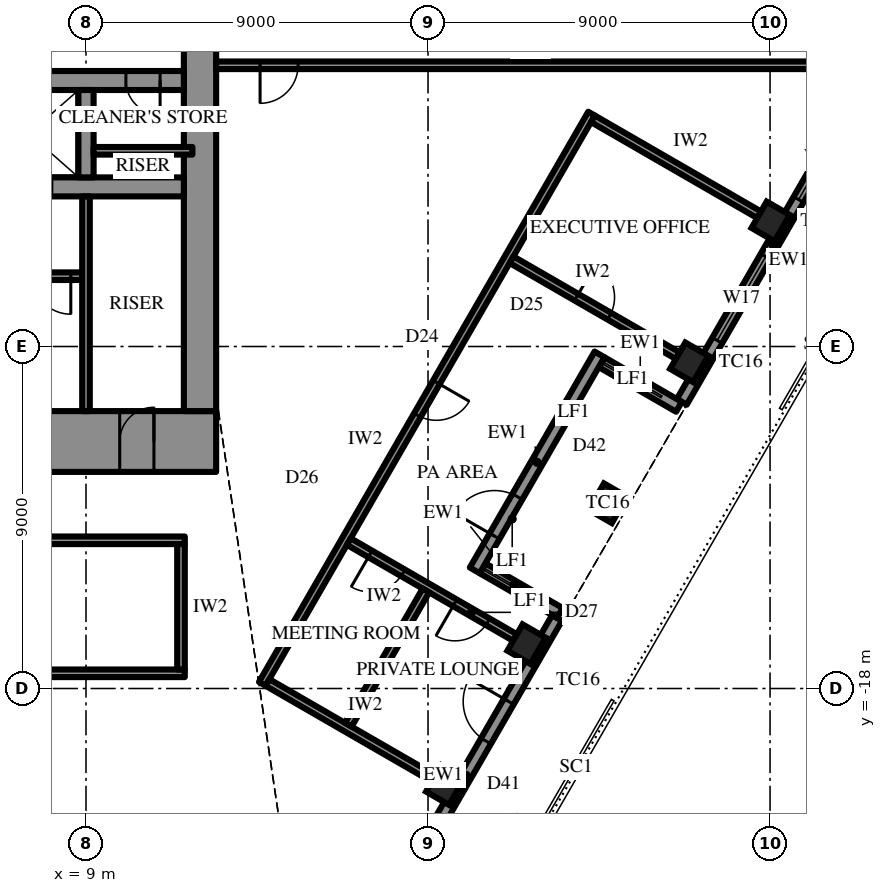
"""IFC4 building model, lengths in metres.
Left out: names, types, materials, properties, quantities, classifications, styles, units other than length and angle.
Written with IfcOpenShell. Run it as: python <this file> out.ifc"""

import sys

from ifc_helpers import new_model, si_unit, direction, frame, frame_2d, origin, origin_2d, place, context, subcontext, project, spatial, rectangle, extrude, element, fill, save


model = new_model("IFC4")
c1 = context("Model", 3, precision=1e-05, world=origin(), true_north=direction((0.0, 1.0)))
c2 = subcontext(c1, "Body", "Model", "MODEL_VIEW")
j1 = project(units=[si_unit("LENGTHUNIT", "METRE"), si_unit("PLANEANGLEUNIT", "RADIAN")], contexts=[c1])
p1 = place(None, origin())
s1 = spatial("IfcSite", under=j1, at=p1, CompositionType="ELEMENT")
p2 = place(p1, origin())
s2 = spatial("IfcBuilding", under=s1, at=p2, CompositionType="ELEMENT")
p3 = place(p2, frame((0.0, 0.0, 378.7)))
s3 = spatial("IfcBuildingStorey", under=s2, at=p3, CompositionType="ELEMENT", Elevation=378.7)
for number, where, z_axis, x_axis in (
    (1, (18.451, -20.542, 0.0), (0.0, 0.0, 1.0), (0.5, 0.866, 0.0)),
    (2, (20.592, -16.833, 0.0), (0.0, 0.0, 1.0), (0.5, 0.866, 0.0)),
    (3, (22.733, -13.125, 0.0), (0.0, 0.0, 1.0), (0.5, 0.866, 0.0)),
    (4, (24.874, -9.417, 0.0), (0.0, 0.0, 1.0), (0.5, 0.866, 0.0)),
    (5, (27.015, -5.708, 0.0), (0.0, 0.0, 1.0), (0.5, 0.866, 0.0)),
):
    element("IfcColumn", number, at=place(p3, frame(where, z_axis=z_axis, x_axis=x_axis)), inside=s3, PredefinedType="COLUMN", context=c2, shape_type="SweptSolid", body=[
        extrude(rectangle(XDim=0.8, YDim=0.7, at=origin_2d()), origin(), (0.0, 0.0, 1.0), 4.2),
    ])
p4 = place(p3, frame((12.425, -11.5, 0.0), z_axis=(0.0, 0.0, 1.0), x_axis=(-1.0, 0.0, 0.0)))
e6 = element("IfcWall", 6, at=p4, inside=s3, PredefinedType="SHEAR", context=c2, shape_type="SweptSolid", body=[
    extrude(rectangle(XDim=24.85, YDim=1.6, at=frame_2d((12.425, 0.0))), origin(), (0.0, 0.0, 1.0), 4.2),
])
p5 = place(p4, frame((13.275, 0.0, 0.0)))
e7 = element("IfcOpeningElement", 7, at=p5, cuts=e6, PredefinedType="OPENING", context=c2, shape_type="SweptSolid", body=[
    extrude(rectangle(XDim=0.9, YDim=2.2, at=frame_2d((0.45, 1.1))), frame((0.0, 0.81, 0.0), z_axis=(0.0, -1.0, 0.0), x_axis=(1.0, 0.0, 0.0)), (0.0, 0.0, 1.0), 1.62),
])
p6 = place(p4, frame((16.275, 0.0, 0.0)))
e8 = element("IfcOpeningElement", 8, at=p6, cuts=e6, PredefinedType="OPENING", context=c2, shape_type="SweptSolid", body=[
    extrude(rectangle(XDim=0.9, YDim=2.2, at=frame_2d((0.45, 1.1))), frame((0.0, 0.81, 0.0), z_axis=(0.0, -1.0, 0.0), x_axis=(1.0, 0.0, 0.0)), (0.0, 0.0, 1.0), 1.62),
])
p7 = place(p4, frame((19.325, 0.0, 0.0)))
e9 = element("IfcOpeningElement", 9, at=p7, cuts=e6, PredefinedType="OPENING", context=c2, shape_type="SweptSolid", body=[
    extrude(rectangle(XDim=1.0, YDim=2.2, at=frame_2d((0.5, 1.1))), frame((0.0, 0.81, 0.0), z_axis=(0.0, -1.0, 0.0), x_axis=(1.0, 0.0, 0.0)), (0.0, 0.0, 1.0), 1.62),
])
p8 = place(p4, frame((1.637, 0.0, 0.0)))
e10 = element("IfcOpeningElement", 10, at=p8, cuts=e6, PredefinedType="OPENING", context=c2, shape_type="SweptSolid", body=[
    extrude(rectangle(XDim=0.9, YDim=2.2, at=frame_2d((0.45, 1.1))), frame((0.0, 0.81, 0.0), z_axis=(0.0, -1.0, 0.0), x_axis=(1.0, 0.0, 0.0)), (0.0, 0.0, 1.0), 1.62),
])
p9 = place(p4, frame((22.312, 0.0, 0.0)))
e11 = element("IfcOpeningElement", 11, at=p9, cuts=e6, PredefinedType="OPENING", context=c2, shape_type="SweptSolid", body=[
    extrude(rectangle(XDim=0.9, YDim=2.2, at=frame_2d((0.45, 1.1))), frame((0.0, 0.81, 0.0), z_axis=(0.0, -1.0, 0.0), x_axis=(1.0, 0.0, 0.0)), (0.0, 0.0, 1.0), 1.62),
])
p10 = place(p3, frame((12.0, -10.7, 0.0), z_axis=(0.0, 0.0, 1.0), x_axis=(0.0, 1.0, 0.0)))
e12 = element("IfcWall", 12, at=p10, inside=s3, PredefinedType="SHEAR", context=c2, shape_type="SweptSolid", body=[
    extrude(rectangle(XDim=21.4, YDim=0.85, at=frame_2d((10.7, 0.0))), origin(), (0.0, 0.0, 1.0), 4.2),
])
p11 = place(p10, frame((9.8, 0.0, 0.0)))
e13 = element("IfcOpeningElement", 13, at=p11, cuts=e12, PredefinedType="OPENING", context=c2, shape_type="SweptSolid", body=[
    extrude(rectangle(XDim=1.8, YDim=2.4, at=frame_2d((0.9, 1.2))), frame((0.0, 0.435, 0.0), z_axis=(0.0, -1.0, 0.0), x_axis=(1.0, 0.0, 0.0)), (0.0, 0.0, 1.0), 0.87),
])
p12 = place(p3, frame((11.575, -2.0, 0.0), z_axis=(0.0, 0.0, 1.0), x_axis=(-1.0, 0.0, 0.0)))
e14 = element("IfcWall", 14, at=p12, inside=s3, PredefinedType="SHEAR", context=c2, shape_type="SweptSolid", body=[
    extrude(rectangle(XDim=5.775, YDim=0.5, at=frame_2d((2.887, 0.0))), origin(), (0.0, 0.0, 1.0), 4.2),
])
p13 = place(p12, frame((0.625, 0.0, 0.0)))
e15 = element("IfcOpeningElement", 15, at=p13, cuts=e14, PredefinedType="OPENING", context=c2, shape_type="SweptSolid", body=[
    extrude(rectangle(XDim=0.9, YDim=2.2, at=frame_2d((0.45, 1.1))), frame((0.0, 0.26, 0.0), z_axis=(0.0, -1.0, 0.0), x_axis=(1.0, 0.0, 0.0)), (0.0, 0.0, 1.0), 0.52),
])
p14 = place(p3, frame((11.575, -4.8, 0.0), z_axis=(0.0, 0.0, 1.0), x_axis=(-1.0, 0.0, 0.0)))
e16 = element("IfcWall", 16, at=p14, inside=s3, PredefinedType="SHEAR", context=c2, shape_type="SweptSolid", body=[
    extrude(rectangle(XDim=23.15, YDim=0.5, at=frame_2d((11.575, 0.0))), origin(), (0.0, 0.0, 1.0), 4.2),
])
p15 = place(p14, frame((6.475, 0.0, 0.0)))
e17 = element("IfcOpeningElement", 17, at=p15, cuts=e16, PredefinedType="OPENING", context=c2, shape_type="SweptSolid", body=[
    extrude(rectangle(XDim=1.2, YDim=2.2, at=frame_2d((0.6, 1.1))), frame((0.0, 0.26, 0.0), z_axis=(0.0, -1.0, 0.0), x_axis=(1.0, 0.0, 0.0)), (0.0, 0.0, 1.0), 0.52),
])
p16 = place(p14, frame((3.475, 0.0, 0.0)))
e18 = element("IfcOpeningElement", 18, at=p16, cuts=e16, PredefinedType="OPENING", context=c2, shape_type="SweptSolid", body=[
    extrude(rectangle(XDim=1.2, YDim=2.2, at=frame_2d((0.6, 1.1))), frame((0.0, 0.26, 0.0), z_axis=(0.0, -1.0, 0.0), x_axis=(1.0, 0.0, 0.0)), (0.0, 0.0, 1.0), 0.52),
])
p17 = place(p3, frame((9.0, -2.25, 0.0), z_axis=(0.0, 0.0, 1.0), x_axis=(0.0, -1.0, 0.0)))
e19 = element("IfcWall", 19, at=p17, inside=s3, PredefinedType="SHEAR", context=c2, shape_type="SweptSolid", body=[
    extrude(rectangle(XDim=2.3, YDim=0.4, at=frame_2d((1.15, 0.0))), origin(), (0.0, 0.0, 1.0), 4.2),
])
p18 = place(p3, frame((8.9, -7.15, 0.0), z_axis=(0.0, 0.0, 1.0), x_axis=(-1.0, 0.0, 0.0)))
e20 = element("IfcWall", 20, at=p18, inside=s3, PredefinedType="SHEAR", context=c2, shape_type="SweptSolid", body=[
    extrude(rectangle(XDim=8.6, YDim=0.2, at=frame_2d((4.3, 0.0))), origin(), (0.0, 0.0, 1.0), 4.2),
])
p19 = place(p18, frame((0.3, 0.0, 0.0)))
e21 = element("IfcOpeningElement", 21, at=p19, cuts=e20, PredefinedType="OPENING", context=c2, shape_type="SweptSolid", body=[
    extrude(rectangle(XDim=1.0, YDim=2.2, at=frame_2d((0.5, 1.1))), frame((0.0, 0.11, 0.0), z_axis=(0.0, -1.0, 0.0), x_axis=(1.0, 0.0, 0.0)), (0.0, 0.0, 1.0), 0.22),
])
p20 = place(p3, frame((16.613, -24.425, 0.0), z_axis=(0.0, 0.0, 1.0), x_axis=(0.499996453679, 0.866027451244, 0.0)))
e22 = element("IfcWall", 22, at=p20, inside=s3, PredefinedType="SOLIDWALL", context=c2, shape_type="SweptSolid", body=[
    extrude(rectangle(XDim=9.564, YDim=0.3, at=frame_2d((4.782, 0.0))), origin(), (0.0, 0.0, 1.0), 2.9),
])
p21 = place(p20, frame((0.866, 0.0, 0.6)))
e23 = element("IfcOpeningElement", 23, at=p21, cuts=e22, PredefinedType="OPENING", context=c2, shape_type="SweptSolid", body=[
    extrude(rectangle(XDim=2.55, YDim=2.05, at=frame_2d((1.275, 1.025))), frame((0.0, 0.16, 0.0), z_axis=(0.0, -1.0, 0.0), x_axis=(1.0, 0.0, 0.0)), (0.0, 0.0, 1.0), 0.32),
])
p22 = place(p20, frame((5.823, 0.0, 0.0)))
e24 = element("IfcOpeningElement", 24, at=p22, cuts=e22, PredefinedType="OPENING", context=c2, shape_type="SweptSolid", body=[
    extrude(rectangle(XDim=1.2, YDim=2.4, at=frame_2d((0.6, 1.2))), frame((0.0, 0.16, 0.0), z_axis=(0.0, -1.0, 0.0), x_axis=(1.0, 0.0, 0.0)), (0.0, 0.0, 1.0), 0.32),
])
p23 = place(p3, frame((24.677, -10.458, 0.0), z_axis=(0.0, 0.0, 1.0), x_axis=(0.499996453679, 0.866027451244, 0.0)))
e25 = element("IfcWall", 25, at=p23, inside=s3, PredefinedType="SOLIDWALL", context=c2, shape_type="SweptSolid", body=[
    extrude(rectangle(XDim=9.564, YDim=0.3, at=frame_2d((4.782, 0.0))), origin(), (0.0, 0.0, 1.0), 2.9),
])
p24 = place(p23, frame((1.866, 0.0, 0.6)))
e26 = element("IfcOpeningElement", 26, at=p24, cuts=e25, PredefinedType="OPENING", context=c2, shape_type="SweptSolid", body=[
    extrude(rectangle(XDim=2.55, YDim=2.05, at=frame_2d((1.275, 1.025))), frame((0.0, 0.16, 0.0), z_axis=(0.0, -1.0, 0.0), x_axis=(1.0, 0.0, 0.0)), (0.0, 0.0, 1.0), 0.32),
])
p25 = place(p23, frame((6.148, 0.0, 0.6)))
e27 = element("IfcOpeningElement", 27, at=p25, cuts=e25, PredefinedType="OPENING", context=c2, shape_type="SweptSolid", body=[
    extrude(rectangle(XDim=2.55, YDim=2.05, at=frame_2d((1.275, 1.025))), frame((0.0, 0.16, 0.0), z_axis=(0.0, -1.0, 0.0), x_axis=(1.0, 0.0, 0.0)), (0.0, 0.0, 1.0), 0.32),
])
for number, where, z_axis, x_axis in (
    (28, (21.47, -16.012, 0.0), (0.0, 0.0, 1.0), (-0.866, 0.5, 0.0)),
    (29, (24.602, -10.588, 0.0), (0.0, 0.0, 1.0), (-0.866, 0.5, 0.0)),
):
    element("IfcWall", number, at=place(p3, frame(where, z_axis=z_axis, x_axis=x_axis)), inside=s3, PredefinedType="SOLIDWALL", context=c2, shape_type="SweptSolid", body=[
        extrude(rectangle(XDim=2.35, YDim=0.3, at=frame_2d((1.175, 0.0))), origin(), (0.0, 0.0, 1.0), 2.9),
    ])
p26 = place(p3, frame((19.23, -14.892, 0.0), z_axis=(0.0, 0.0, 1.0), x_axis=(0.499999339774, 0.866025784966, 0.0)))
e30 = element("IfcWall", 30, at=p26, inside=s3, PredefinedType="SOLIDWALL", context=c2, shape_type="SweptSolid", body=[
    extrude(rectangle(XDim=6.564, YDim=0.3, at=frame_2d((3.282, 0.0))), origin(), (0.0, 0.0, 1.0), 2.9),
])
p27 = place(p26, frame((1.041, 0.0, 0.0)))
e31 = element("IfcOpeningElement", 31, at=p27, cuts=e30, PredefinedType="OPENING", context=c2, shape_type="SweptSolid", body=[
    extrude(rectangle(XDim=1.2, YDim=2.4, at=frame_2d((0.6, 1.2))), frame((0.0, 0.16, 0.0), z_axis=(0.0, -1.0, 0.0), x_axis=(1.0, 0.0, 0.0)), (0.0, 0.0, 1.0), 0.32),
])
p28 = place(p3, frame((9.0, -5.05, 0.0), z_axis=(0.0, 0.0, 1.0), x_axis=(0.0, -1.0, 0.0)))
e32 = element("IfcWall", 32, at=p28, inside=s3, PredefinedType="PARTITIONING", context=c2, shape_type="SweptSolid", body=[
    extrude(rectangle(XDim=5.65, YDim=0.2, at=frame_2d((2.825, 0.0))), origin(), (0.0, 0.0, 1.0), 4.0),
])
p29 = place(p3, frame((11.8, -3.85, 0.0), z_axis=(0.0, 0.0, 1.0), x_axis=(-1.0, 0.0, 0.0)))
e33 = element("IfcWall", 33, at=p29, inside=s3, PredefinedType="PARTITIONING", context=c2, shape_type="SweptSolid", body=[
    extrude(rectangle(XDim=2.6, YDim=0.2, at=frame_2d((1.3, 0.0))), origin(), (0.0, 0.0, 1.0), 4.0),
])
p30 = place(p3, frame((11.6, -14.1, 0.0), z_axis=(0.0, 0.0, 1.0), x_axis=(-1.0, 0.0, 0.0)))
e34 = element("IfcWall", 34, at=p30, inside=s3, PredefinedType="PARTITIONING", context=c2, shape_type="SweptSolid", body=[
    extrude(rectangle(XDim=23.2, YDim=0.2, at=frame_2d((11.6, 0.0))), origin(), (0.0, 0.0, 1.0), 4.0),
])
p31 = place(p3, frame((11.6, -17.6, 0.0), z_axis=(0.0, 0.0, 1.0), x_axis=(-1.0, 0.0, 0.0)))
e35 = element("IfcWall", 35, at=p31, inside=s3, PredefinedType="PARTITIONING", context=c2, shape_type="SweptSolid", body=[
    extrude(rectangle(XDim=23.2, YDim=0.2, at=frame_2d((11.6, 0.0))), origin(), (0.0, 0.0, 1.0), 4.0),
])
p32 = place(p31, frame((4.2, 0.0, 0.0)))
e36 = element("IfcOpeningElement", 36, at=p32, cuts=e35, PredefinedType="OPENING", context=c2, shape_type="SweptSolid", body=[
    extrude(rectangle(XDim=1.0, YDim=2.2, at=frame_2d((0.5, 1.1))), frame((0.0, 0.11, 0.0), z_axis=(0.0, -1.0, 0.0), x_axis=(1.0, 0.0, 0.0)), (0.0, 0.0, 1.0), 0.22),
])
p33 = place(p31, frame((12.25, 0.0, 0.0)))
e37 = element("IfcOpeningElement", 37, at=p33, cuts=e35, PredefinedType="OPENING", context=c2, shape_type="SweptSolid", body=[
    extrude(rectangle(XDim=1.0, YDim=2.2, at=frame_2d((0.5, 1.1))), frame((0.0, 0.11, 0.0), z_axis=(0.0, -1.0, 0.0), x_axis=(1.0, 0.0, 0.0)), (0.0, 0.0, 1.0), 0.22),
])
p34 = place(p31, frame((19.15, 0.0, 0.0)))
e38 = element("IfcOpeningElement", 38, at=p34, cuts=e35, PredefinedType="OPENING", context=c2, shape_type="SweptSolid", body=[
    extrude(rectangle(XDim=1.0, YDim=2.2, at=frame_2d((0.5, 1.1))), frame((0.0, 0.11, 0.0), z_axis=(0.0, -1.0, 0.0), x_axis=(1.0, 0.0, 0.0)), (0.0, 0.0, 1.0), 0.22),
])
p35 = place(p3, frame((11.5, -14.2, 0.0), z_axis=(0.0, 0.0, 1.0), x_axis=(0.0, -1.0, 0.0)))
e39 = element("IfcWall", 39, at=p35, inside=s3, PredefinedType="PARTITIONING", context=c2, shape_type="SweptSolid", body=[
    extrude(rectangle(XDim=3.3, YDim=0.2, at=frame_2d((1.65, 0.0))), origin(), (0.0, 0.0, 1.0), 4.0),
])
p36 = place(p3, frame((13.638, -17.878, 0.0), z_axis=(0.0, 0.0, 1.0), x_axis=(0.500006217173, 0.866021814268, 0.0)))
e40 = element("IfcWall", 40, at=p36, inside=s3, PredefinedType="PARTITIONING", context=c2, shape_type="SweptSolid", body=[
    extrude(rectangle(XDim=17.328, YDim=0.2, at=frame_2d((8.664, 0.0))), origin(), (0.0, 0.0, 1.0), 4.0),
])
p37 = place(p36, frame((8.164, 0.0, 0.0)))
e41 = element("IfcOpeningElement", 41, at=p37, cuts=e40, PredefinedType="OPENING", context=c2, shape_type="SweptSolid", body=[
    extrude(rectangle(XDim=1.0, YDim=2.2, at=frame_2d((0.5, 1.1))), frame((0.0, 0.11, 0.0), z_axis=(0.0, -1.0, 0.0), x_axis=(1.0, 0.0, 0.0)), (0.0, 0.0, 1.0), 0.22),
])
p38 = place(p3, frame((13.775, -17.842, 0.0), z_axis=(0.0, 0.0, 1.0), x_axis=(0.866006046928, -0.500033525561, 0.0)))
e42 = element("IfcWall", 42, at=p38, inside=s3, PredefinedType="PARTITIONING", context=c2, shape_type="SweptSolid", body=[
    extrude(rectangle(XDim=5.05, YDim=0.2, at=frame_2d((2.525, 0.0))), origin(), (0.0, 0.0, 1.0), 3.082),
])
p39 = place(p3, frame((15.916, -14.133, 0.0), z_axis=(0.0, 0.0, 1.0), x_axis=(0.866018134068, -0.500012591307, 0.0)))
e43 = element("IfcWall", 43, at=p39, inside=s3, PredefinedType="PARTITIONING", context=c2, shape_type="SweptSolid", body=[
    extrude(rectangle(XDim=5.05, YDim=0.2, at=frame_2d((2.525, 0.0))), origin(), (0.0, 0.0, 1.0), 3.082),
])
p40 = place(p39, frame((0.65, 0.0, 0.0)))
e44 = element("IfcOpeningElement", 44, at=p40, cuts=e43, PredefinedType="OPENING", context=c2, shape_type="SweptSolid", body=[
    extrude(rectangle(XDim=1.0, YDim=2.2, at=frame_2d((0.5, 1.1))), frame((0.0, 0.11, 0.0), z_axis=(0.0, -1.0, 0.0), x_axis=(1.0, 0.0, 0.0)), (0.0, 0.0, 1.0), 0.22),
])
p41 = place(p39, frame((3.225, 0.0, 0.0)))
e45 = element("IfcOpeningElement", 45, at=p41, cuts=e43, PredefinedType="OPENING", context=c2, shape_type="SweptSolid", body=[
    extrude(rectangle(XDim=1.0, YDim=2.2, at=frame_2d((0.5, 1.1))), frame((0.0, 0.11, 0.0), z_axis=(0.0, -1.0, 0.0), x_axis=(1.0, 0.0, 0.0)), (0.0, 0.0, 1.0), 0.22),
])
p42 = place(p3, frame((20.198, -6.717, 0.0), z_axis=(0.0, 0.0, 1.0), x_axis=(0.866006046928, -0.500033525561, 0.0)))
e46 = element("IfcWall", 46, at=p42, inside=s3, PredefinedType="PARTITIONING", context=c2, shape_type="SweptSolid", body=[
    extrude(rectangle(XDim=5.05, YDim=0.2, at=frame_2d((2.525, 0.0))), origin(), (0.0, 0.0, 1.0), 2.992),
])
p43 = place(p42, frame((1.975, 0.0, 0.0)))
e47 = element("IfcOpeningElement", 47, at=p43, cuts=e46, PredefinedType="OPENING", context=c2, shape_type="SweptSolid", body=[
    extrude(rectangle(XDim=1.0, YDim=2.2, at=frame_2d((0.5, 1.1))), frame((0.0, 0.11, 0.0), z_axis=(0.0, -1.0, 0.0), x_axis=(1.0, 0.0, 0.0)), (0.0, 0.0, 1.0), 0.22),
])
p44 = place(p3, frame((22.339, -3.008, 0.0), z_axis=(0.0, 0.0, 1.0), x_axis=(0.866018134068, -0.500012591307, 0.0)))
e48 = element("IfcWall", 48, at=p44, inside=s3, PredefinedType="PARTITIONING", context=c2, shape_type="SweptSolid", body=[
    extrude(rectangle(XDim=5.05, YDim=0.2, at=frame_2d((2.525, 0.0))), origin(), (0.0, 0.0, 1.0), 3.082),
])
p45 = place(p3, frame((15.903, -18.955, 0.0), z_axis=(0.0, 0.0, 1.0), x_axis=(0.499998569178, 0.866026229868, 0.0)))
e49 = element("IfcWall", 49, at=p45, inside=s3, PredefinedType="PARTITIONING", context=c2, shape_type="SweptSolid", body=[
    extrude(rectangle(XDim=4.082, YDim=0.2, at=frame_2d((2.041, 0.0))), origin(), (0.0, 0.0, 1.0), 4.0),
])
p46 = place(p3, frame((12.425, -1.6, 0.0), z_axis=(0.0, 0.0, 1.0), x_axis=(1.0, 0.0, 0.0)))
e50 = element("IfcWall", 50, at=p46, inside=s3, PredefinedType="PARTITIONING", context=c2, shape_type="SweptSolid", body=[
    extrude(rectangle(XDim=16.558, YDim=0.2, at=frame_2d((8.279, 0.0))), origin(), (0.0, 0.0, 1.0), 4.0),
])
p47 = place(p46, frame((1.156, 0.0, 0.0)))
e51 = element("IfcOpeningElement", 51, at=p47, cuts=e50, PredefinedType="OPENING", context=c2, shape_type="SweptSolid", body=[
    extrude(rectangle(XDim=1.0, YDim=2.2, at=frame_2d((0.5, 1.1))), frame((0.0, 0.11, 0.0), z_axis=(0.0, -1.0, 0.0), x_axis=(1.0, 0.0, 0.0)), (0.0, 0.0, 1.0), 0.22),
])
p48 = place(p22, origin())
e52 = element("IfcDoor", 52, at=p48, inside=s3, OperationType="SINGLE_SWING_LEFT", PredefinedType="DOOR", context=c2, shape_type="SweptSolid", body=[
    extrude(rectangle(XDim=1.2, YDim=2.4, at=frame_2d((0.6, 1.2))), frame((0.0, 0.025, 0.0), z_axis=(0.0, -1.0, 0.0), x_axis=(1.0, 0.0, 0.0)), (0.0, 0.0, 1.0), 0.05),
])
fill(e24, e52)
p49 = place(p24, origin())
e53 = element("IfcWindow", 53, at=p49, inside=s3, PartitioningType="SINGLE_PANEL", PredefinedType="WINDOW", context=c2, shape_type="SweptSolid", body=[
    extrude(rectangle(XDim=2.55, YDim=2.05, at=frame_2d((1.275, 1.025))), frame((0.0, 0.03, 0.0), z_axis=(0.0, -1.0, 0.0), x_axis=(1.0, 0.0, 0.0)), (0.0, 0.0, 1.0), 0.06),
])
fill(e26, e53)
p50 = place(p25, origin())
e54 = element("IfcWindow", 54, at=p50, inside=s3, PartitioningType="SINGLE_PANEL", PredefinedType="WINDOW", context=c2, shape_type="SweptSolid", body=[
    extrude(rectangle(XDim=2.55, YDim=2.05, at=frame_2d((1.275, 1.025))), frame((0.0, 0.03, 0.0), z_axis=(0.0, -1.0, 0.0), x_axis=(1.0, 0.0, 0.0)), (0.0, 0.0, 1.0), 0.06),
])
fill(e27, e54)
p51 = place(p27, origin())
e55 = element("IfcDoor", 55, at=p51, inside=s3, OperationType="SINGLE_SWING_RIGHT", PredefinedType="DOOR", context=c2, shape_type="SweptSolid", body=[
    extrude(rectangle(XDim=1.2, YDim=2.4, at=frame_2d((0.6, 1.2))), frame((0.0, 0.025, 0.0), z_axis=(0.0, -1.0, 0.0), x_axis=(1.0, 0.0, 0.0)), (0.0, 0.0, 1.0), 0.05),
])
fill(e31, e55)
p52 = place(p19, origin())
e56 = element("IfcDoor", 56, at=p52, inside=s3, OperationType="SINGLE_SWING_RIGHT", PredefinedType="DOOR", context=c2, shape_type="SweptSolid", body=[
    extrude(rectangle(XDim=1.0, YDim=2.2, at=frame_2d((0.5, 1.1))), frame((0.0, 0.025, 0.0), z_axis=(0.0, -1.0, 0.0), x_axis=(1.0, 0.0, 0.0)), (0.0, 0.0, 1.0), 0.05),
])
fill(e21, e56)
p53 = place(p8, frame((0.9, 0.0, 0.0), z_axis=(0.0, 0.0, 1.0), x_axis=(-1.0, 0.0, 0.0)))
e57 = element("IfcDoor", 57, at=p53, inside=s3, OperationType="SINGLE_SWING_LEFT", PredefinedType="DOOR", context=c2, shape_type="SweptSolid", body=[
    extrude(rectangle(XDim=0.9, YDim=2.2, at=frame_2d((0.45, 1.1))), frame((0.0, 0.025, 0.0), z_axis=(0.0, -1.0, 0.0), x_axis=(1.0, 0.0, 0.0)), (0.0, 0.0, 1.0), 0.05),
])
fill(e10, e57)
p54 = place(p13, origin())
e58 = element("IfcDoor", 58, at=p54, inside=s3, OperationType="SINGLE_SWING_RIGHT", PredefinedType="DOOR", context=c2, shape_type="SweptSolid", body=[
    extrude(rectangle(XDim=0.9, YDim=2.2, at=frame_2d((0.45, 1.1))), frame((0.0, 0.025, 0.0), z_axis=(0.0, -1.0, 0.0), x_axis=(1.0, 0.0, 0.0)), (0.0, 0.0, 1.0), 0.05),
])
fill(e15, e58)
p55 = place(p40, frame((1.0, 0.0, 0.0), z_axis=(0.0, 0.0, 1.0), x_axis=(-1.0, 0.0, 0.0)))
e59 = element("IfcDoor", 59, at=p55, inside=s3, OperationType="SINGLE_SWING_LEFT", PredefinedType="DOOR", context=c2, shape_type="SweptSolid", body=[
    extrude(rectangle(XDim=1.0, YDim=2.2, at=frame_2d((0.5, 1.1))), frame((0.0, 0.025, 0.0), z_axis=(0.0, -1.0, 0.0), x_axis=(1.0, 0.0, 0.0)), (0.0, 0.0, 1.0), 0.05),
])
fill(e44, e59)
p56 = place(p41, frame((1.0, 0.0, 0.0), z_axis=(0.0, 0.0, 1.0), x_axis=(-1.0, 0.0, 0.0)))
e60 = element("IfcDoor", 60, at=p56, inside=s3, OperationType="SINGLE_SWING_LEFT", PredefinedType="DOOR", context=c2, shape_type="SweptSolid", body=[
    extrude(rectangle(XDim=1.0, YDim=2.2, at=frame_2d((0.5, 1.1))), frame((0.0, 0.025, 0.0), z_axis=(0.0, -1.0, 0.0), x_axis=(1.0, 0.0, 0.0)), (0.0, 0.0, 1.0), 0.05),
])
fill(e45, e60)
p57 = place(p37, frame((1.0, 0.0, 0.0), z_axis=(0.0, 0.0, 1.0), x_axis=(-1.0, 0.0, 0.0)))
e61 = element("IfcDoor", 61, at=p57, inside=s3, OperationType="SINGLE_SWING_RIGHT", PredefinedType="DOOR", context=c2, shape_type="SweptSolid", body=[
    extrude(rectangle(XDim=1.0, YDim=2.2, at=frame_2d((0.5, 1.1))), frame((0.0, 0.025, 0.0), z_axis=(0.0, -1.0, 0.0), x_axis=(1.0, 0.0, 0.0)), (0.0, 0.0, 1.0), 0.05),
])
fill(e41, e61)
p58 = place(p43, origin())
e62 = element("IfcDoor", 62, at=p58, inside=s3, OperationType="SINGLE_SWING_RIGHT", PredefinedType="DOOR", context=c2, shape_type="SweptSolid", body=[
    extrude(rectangle(XDim=1.0, YDim=2.2, at=frame_2d((0.5, 1.1))), frame((0.0, 0.025, 0.0), z_axis=(0.0, -1.0, 0.0), x_axis=(1.0, 0.0, 0.0)), (0.0, 0.0, 1.0), 0.05),
])
fill(e47, e62)
p59 = place(p47, frame((1.0, 0.0, 0.0), z_axis=(0.0, 0.0, 1.0), x_axis=(-1.0, 0.0, 0.0)))
e63 = element("IfcDoor", 63, at=p59, inside=s3, OperationType="SINGLE_SWING_LEFT", PredefinedType="DOOR", context=c2, shape_type="SweptSolid", body=[
    extrude(rectangle(XDim=1.0, YDim=2.2, at=frame_2d((0.5, 1.1))), frame((0.0, 0.025, 0.0), z_axis=(0.0, -1.0, 0.0), x_axis=(1.0, 0.0, 0.0)), (0.0, 0.0, 1.0), 0.05),
])
fill(e51, e63)
save(model, sys.argv[1])
